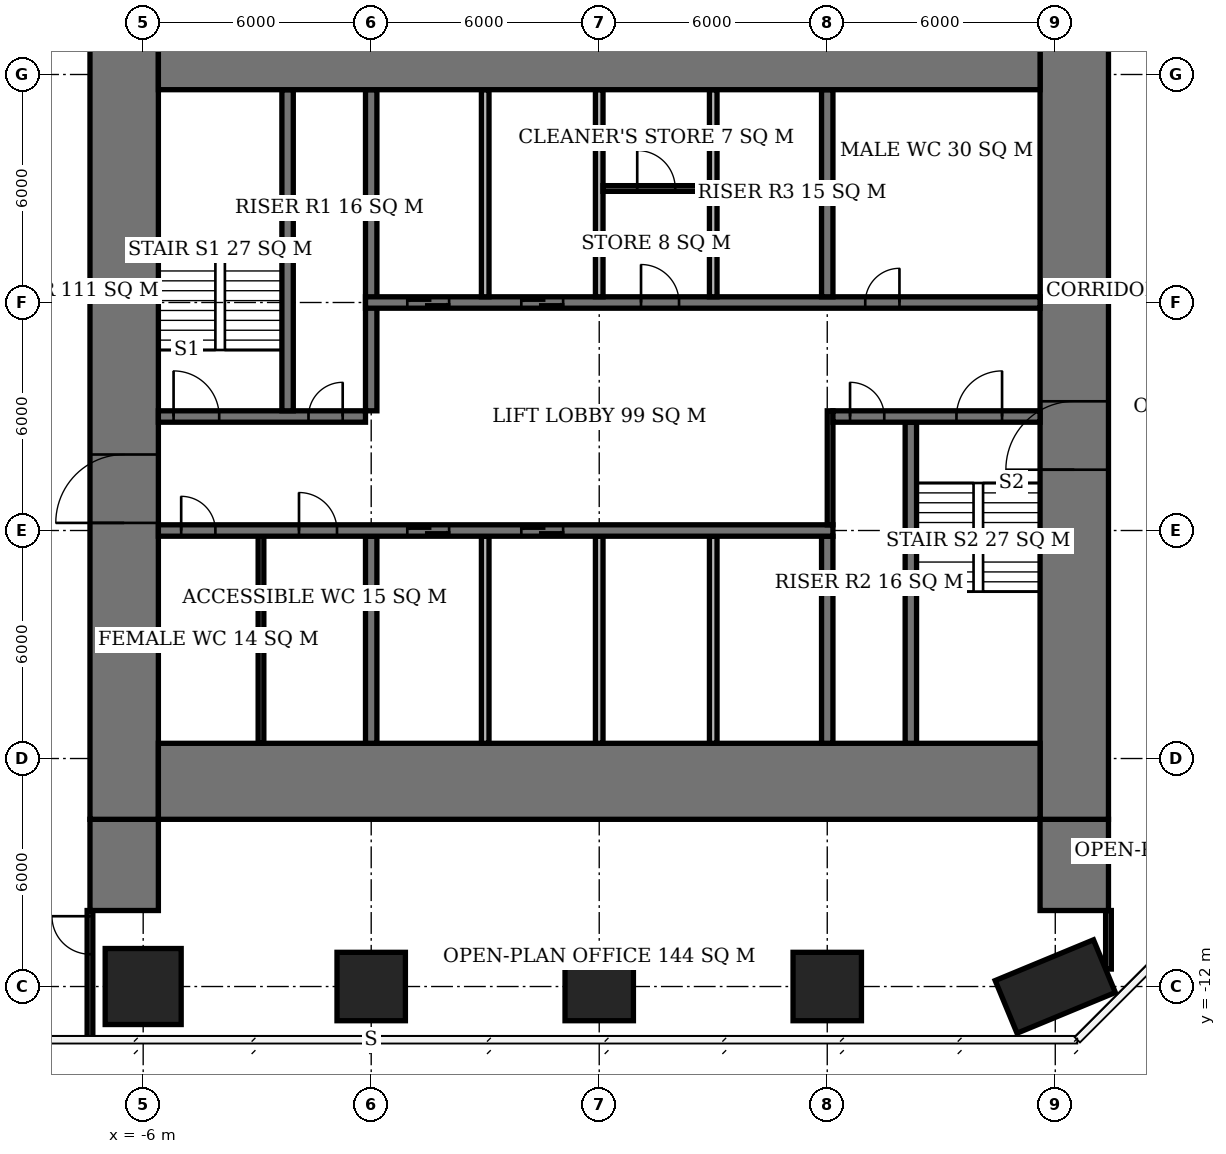
"""IFC4 building model, lengths in metres.
Left out: names, types, materials, properties, quantities, classifications, styles, units other than length and angle.
Written with IfcOpenShell. Run it as: python <this file> out.ifc"""

import sys

from ifc_helpers import new_model, si_unit, direction, frame, frame_2d, origin, origin_2d, place, context, subcontext, project, spatial, rectangle, extrude, element, fill, save


model = new_model("IFC4")
c1 = context("Model", 3, precision=1e-05, world=origin(), true_north=direction((0.0, 1.0)))
c2 = subcontext(c1, "Body", "Model", "MODEL_VIEW")
j1 = project(units=[si_unit("LENGTHUNIT", "METRE"), si_unit("PLANEANGLEUNIT", "RADIAN")], contexts=[c1])
p1 = place(None, origin())
s1 = spatial("IfcSite", under=j1, at=p1, CompositionType="ELEMENT")
p2 = place(p1, origin())
s2 = spatial("IfcBuilding", under=s1, at=p2, CompositionType="ELEMENT")
p3 = place(p2, frame((0.0, 0.0, 109.4)))
s3 = spatial("IfcBuildingStorey", under=s2, at=p3, CompositionType="ELEMENT", Elevation=109.4)
p4 = place(p3, frame((-6.0, -12.0, 0.0), z_axis=(0.0, 0.0, 1.0), x_axis=(1.0, 0.0, 0.0)))
e1 = element("IfcColumn", 1, at=p4, inside=s3, PredefinedType="COLUMN", context=c2, shape_type="SweptSolid", body=[
    extrude(rectangle(XDim=2.0, YDim=2.0, at=origin_2d()), origin(), (0.0, 0.0, 1.0), 3.9),
])
for number, where, z_axis, x_axis in (
    (2, (0.0, -12.0, 0.0), (0.0, 0.0, 1.0), (1.0, 0.0, 0.0)),
    (3, (6.0, -12.0, 0.0), (0.0, 0.0, 1.0), (1.0, 0.0, 0.0)),
    (4, (12.0, -12.0, 0.0), (0.0, 0.0, 1.0), (1.0, 0.0, 0.0)),
):
    element("IfcColumn", number, at=place(p3, frame(where, z_axis=z_axis, x_axis=x_axis)), inside=s3, PredefinedType="COLUMN", context=c2, shape_type="SweptSolid", body=[
        extrude(rectangle(XDim=1.8, YDim=1.8, at=origin_2d()), origin(), (0.0, 0.0, 1.0), 3.9),
    ])
p5 = place(p3, frame((18.0, -12.0, 0.0), z_axis=(0.0, 0.0, 1.0), x_axis=(-0.923879532511, -0.382683432365, 0.0)))
e5 = element("IfcColumn", 5, at=p5, inside=s3, PredefinedType="COLUMN", context=c2, shape_type="SweptSolid", body=[
    extrude(rectangle(XDim=2.8, YDim=1.5, at=origin_2d()), origin(), (0.0, 0.0, 1.0), 3.9),
])
for number, where, z_axis, x_axis in (
    (6, (-5.6, -6.6, 0.0), (0.0, 0.0, 1.0), (1.0, 0.0, 0.0)),
    (7, (-5.6, 12.6, 0.0), (0.0, 0.0, 1.0), (1.0, 0.0, 0.0)),
):
    element("IfcWall", number, at=place(p3, frame(where, z_axis=z_axis, x_axis=x_axis)), inside=s3, PredefinedType="SHEAR", context=c2, shape_type="SweptSolid", body=[
        extrude(rectangle(XDim=23.2, YDim=2.0, at=frame_2d((11.6, 0.0))), origin(), (0.0, 0.0, 1.0), 3.9),
    ])
p6 = place(p3, frame((-6.5, -7.6, 0.0), z_axis=(0.0, 0.0, 1.0), x_axis=(0.0, 1.0, 0.0)))
e8 = element("IfcWall", 8, at=p6, inside=s3, PredefinedType="SHEAR", context=c2, shape_type="SweptSolid", body=[
    extrude(rectangle(XDim=21.2, YDim=1.8, at=frame_2d((10.6, 0.0))), origin(), (0.0, 0.0, 1.0), 3.9),
])
p7 = place(p6, frame((7.8, 0.0, 0.0)))
e9 = element("IfcOpeningElement", 9, at=p7, cuts=e8, PredefinedType="OPENING", context=c2, shape_type="SweptSolid", body=[
    extrude(rectangle(XDim=1.8, YDim=2.4, at=frame_2d((0.9, 1.2))), frame((0.0, 0.91, 0.0), z_axis=(0.0, -1.0, 0.0), x_axis=(1.0, 0.0, 0.0)), (0.0, 0.0, 1.0), 1.82),
])
p8 = place(p3, frame((18.5, -7.6, 0.0), z_axis=(0.0, 0.0, 1.0), x_axis=(0.0, 1.0, 0.0)))
e10 = element("IfcWall", 10, at=p8, inside=s3, PredefinedType="SHEAR", context=c2, shape_type="SweptSolid", body=[
    extrude(rectangle(XDim=21.2, YDim=1.8, at=frame_2d((10.6, 0.0))), origin(), (0.0, 0.0, 1.0), 3.9),
])
p9 = place(p8, frame((9.2, 0.0, 0.0)))
e11 = element("IfcOpeningElement", 11, at=p9, cuts=e10, PredefinedType="OPENING", context=c2, shape_type="SweptSolid", body=[
    extrude(rectangle(XDim=1.8, YDim=2.4, at=frame_2d((0.9, 1.2))), frame((0.0, 0.91, 0.0), z_axis=(0.0, -1.0, 0.0), x_axis=(1.0, 0.0, 0.0)), (0.0, 0.0, 1.0), 1.82),
])
for number, where, z_axis, x_axis in (
    (12, (-6.5, -10.0, 0.0), (0.0, 0.0, 1.0), (0.0, 1.0, 0.0)),
    (13, (18.5, -10.0, 0.0), (0.0, 0.0, 1.0), (0.0, 1.0, 0.0)),
):
    element("IfcWall", number, at=place(p3, frame(where, z_axis=z_axis, x_axis=x_axis)), inside=s3, PredefinedType="SHEAR", context=c2, shape_type="SweptSolid", body=[
        extrude(rectangle(XDim=2.4, YDim=1.8, at=frame_2d((1.2, 0.0))), origin(), (0.0, 0.0, 1.0), 3.9),
    ])
p10 = place(p3, frame((-5.6, 0.0, 0.0), z_axis=(0.0, 0.0, 1.0), x_axis=(1.0, 0.0, 0.0)))
e14 = element("IfcWall", 14, at=p10, inside=s3, PredefinedType="SHEAR", context=c2, shape_type="SweptSolid", body=[
    extrude(rectangle(XDim=17.75, YDim=0.3, at=frame_2d((8.875, 0.0))), origin(), (0.0, 0.0, 1.0), 3.9),
])
p11 = place(p10, frame((0.6, 0.0, 0.0)))
e15 = element("IfcOpeningElement", 15, at=p11, cuts=e14, PredefinedType="OPENING", context=c2, shape_type="SweptSolid", body=[
    extrude(rectangle(XDim=0.9, YDim=2.1, at=frame_2d((0.45, 1.05))), frame((0.0, 0.16, 0.0), z_axis=(0.0, -1.0, 0.0), x_axis=(1.0, 0.0, 0.0)), (0.0, 0.0, 1.0), 0.32),
])
p12 = place(p10, frame((3.7, 0.0, 0.0)))
e16 = element("IfcOpeningElement", 16, at=p12, cuts=e14, PredefinedType="OPENING", context=c2, shape_type="SweptSolid", body=[
    extrude(rectangle(XDim=1.0, YDim=2.1, at=frame_2d((0.5, 1.05))), frame((0.0, 0.16, 0.0), z_axis=(0.0, -1.0, 0.0), x_axis=(1.0, 0.0, 0.0)), (0.0, 0.0, 1.0), 0.32),
])
p13 = place(p10, frame((6.55, 0.0, 0.0)))
e17 = element("IfcOpeningElement", 17, at=p13, cuts=e14, PredefinedType="OPENING", context=c2, shape_type="SweptSolid", body=[
    extrude(rectangle(XDim=1.1, YDim=2.1, at=frame_2d((0.55, 1.05))), frame((0.0, 0.16, 0.0), z_axis=(0.0, -1.0, 0.0), x_axis=(1.0, 0.0, 0.0)), (0.0, 0.0, 1.0), 0.32),
])
p14 = place(p10, frame((9.55, 0.0, 0.0)))
e18 = element("IfcOpeningElement", 18, at=p14, cuts=e14, PredefinedType="OPENING", context=c2, shape_type="SweptSolid", body=[
    extrude(rectangle(XDim=1.1, YDim=2.1, at=frame_2d((0.55, 1.05))), frame((0.0, 0.16, 0.0), z_axis=(0.0, -1.0, 0.0), x_axis=(1.0, 0.0, 0.0)), (0.0, 0.0, 1.0), 0.32),
])
p15 = place(p3, frame((-5.6, 3.0, 0.0), z_axis=(0.0, 0.0, 1.0), x_axis=(1.0, 0.0, 0.0)))
e19 = element("IfcWall", 19, at=p15, inside=s3, PredefinedType="SHEAR", context=c2, shape_type="SweptSolid", body=[
    extrude(rectangle(XDim=5.45, YDim=0.3, at=frame_2d((2.725, 0.0))), origin(), (0.0, 0.0, 1.0), 3.9),
])
p16 = place(p15, frame((0.4, 0.0, 0.0)))
e20 = element("IfcOpeningElement", 20, at=p16, cuts=e19, PredefinedType="OPENING", context=c2, shape_type="SweptSolid", body=[
    extrude(rectangle(XDim=1.2, YDim=2.1, at=frame_2d((0.6, 1.05))), frame((0.0, 0.16, 0.0), z_axis=(0.0, -1.0, 0.0), x_axis=(1.0, 0.0, 0.0)), (0.0, 0.0, 1.0), 0.32),
])
p17 = place(p15, frame((3.95, 0.0, 0.0)))
e21 = element("IfcOpeningElement", 21, at=p17, cuts=e19, PredefinedType="OPENING", context=c2, shape_type="SweptSolid", body=[
    extrude(rectangle(XDim=0.9, YDim=2.1, at=frame_2d((0.45, 1.05))), frame((0.0, 0.16, 0.0), z_axis=(0.0, -1.0, 0.0), x_axis=(1.0, 0.0, 0.0)), (0.0, 0.0, 1.0), 0.32),
])
p18 = place(p3, frame((12.15, 3.0, 0.0), z_axis=(0.0, 0.0, 1.0), x_axis=(1.0, 0.0, 0.0)))
e22 = element("IfcWall", 22, at=p18, inside=s3, PredefinedType="SHEAR", context=c2, shape_type="SweptSolid", body=[
    extrude(rectangle(XDim=5.45, YDim=0.3, at=frame_2d((2.725, 0.0))), origin(), (0.0, 0.0, 1.0), 3.9),
])
p19 = place(p18, frame((3.25, 0.0, 0.0)))
e23 = element("IfcOpeningElement", 23, at=p19, cuts=e22, PredefinedType="OPENING", context=c2, shape_type="SweptSolid", body=[
    extrude(rectangle(XDim=1.2, YDim=2.1, at=frame_2d((0.6, 1.05))), frame((0.0, 0.16, 0.0), z_axis=(0.0, -1.0, 0.0), x_axis=(1.0, 0.0, 0.0)), (0.0, 0.0, 1.0), 0.32),
])
p20 = place(p18, frame((0.45, 0.0, 0.0)))
e24 = element("IfcOpeningElement", 24, at=p20, cuts=e22, PredefinedType="OPENING", context=c2, shape_type="SweptSolid", body=[
    extrude(rectangle(XDim=0.9, YDim=2.1, at=frame_2d((0.45, 1.05))), frame((0.0, 0.16, 0.0), z_axis=(0.0, -1.0, 0.0), x_axis=(1.0, 0.0, 0.0)), (0.0, 0.0, 1.0), 0.32),
])
p21 = place(p3, frame((-0.15, 6.0, 0.0), z_axis=(0.0, 0.0, 1.0), x_axis=(1.0, 0.0, 0.0)))
e25 = element("IfcWall", 25, at=p21, inside=s3, PredefinedType="SHEAR", context=c2, shape_type="SweptSolid", body=[
    extrude(rectangle(XDim=17.75, YDim=0.3, at=frame_2d((8.875, 0.0))), origin(), (0.0, 0.0, 1.0), 3.9),
])
p22 = place(p21, frame((13.15, 0.0, 0.0)))
e26 = element("IfcOpeningElement", 26, at=p22, cuts=e25, PredefinedType="OPENING", context=c2, shape_type="SweptSolid", body=[
    extrude(rectangle(XDim=0.9, YDim=2.1, at=frame_2d((0.45, 1.05))), frame((0.0, 0.16, 0.0), z_axis=(0.0, -1.0, 0.0), x_axis=(1.0, 0.0, 0.0)), (0.0, 0.0, 1.0), 0.32),
])
p23 = place(p21, frame((7.25, 0.0, 0.0)))
e27 = element("IfcOpeningElement", 27, at=p23, cuts=e25, PredefinedType="OPENING", context=c2, shape_type="SweptSolid", body=[
    extrude(rectangle(XDim=1.0, YDim=2.1, at=frame_2d((0.5, 1.05))), frame((0.0, 0.16, 0.0), z_axis=(0.0, -1.0, 0.0), x_axis=(1.0, 0.0, 0.0)), (0.0, 0.0, 1.0), 0.32),
])
p24 = place(p21, frame((1.1, 0.0, 0.0)))
e28 = element("IfcOpeningElement", 28, at=p24, cuts=e25, PredefinedType="OPENING", context=c2, shape_type="SweptSolid", body=[
    extrude(rectangle(XDim=1.1, YDim=2.1, at=frame_2d((0.55, 1.05))), frame((0.0, 0.16, 0.0), z_axis=(0.0, -1.0, 0.0), x_axis=(1.0, 0.0, 0.0)), (0.0, 0.0, 1.0), 0.32),
])
p25 = place(p21, frame((4.1, 0.0, 0.0)))
e29 = element("IfcOpeningElement", 29, at=p25, cuts=e25, PredefinedType="OPENING", context=c2, shape_type="SweptSolid", body=[
    extrude(rectangle(XDim=1.1, YDim=2.1, at=frame_2d((0.55, 1.05))), frame((0.0, 0.16, 0.0), z_axis=(0.0, -1.0, 0.0), x_axis=(1.0, 0.0, 0.0)), (0.0, 0.0, 1.0), 0.32),
])
p26 = place(p3, frame((0.0, -5.6, 0.0), z_axis=(0.0, 0.0, 1.0), x_axis=(0.0, 1.0, 0.0)))
e30 = element("IfcWall", 30, at=p26, inside=s3, PredefinedType="SHEAR", context=c2, shape_type="SweptSolid", body=[
    extrude(rectangle(XDim=5.45, YDim=0.3, at=frame_2d((2.725, 0.0))), origin(), (0.0, 0.0, 1.0), 3.9),
])
p27 = place(p3, frame((0.0, 3.15, 0.0), z_axis=(0.0, 0.0, 1.0), x_axis=(0.0, 1.0, 0.0)))
e31 = element("IfcWall", 31, at=p27, inside=s3, PredefinedType="SHEAR", context=c2, shape_type="SweptSolid", body=[
    extrude(rectangle(XDim=8.45, YDim=0.3, at=frame_2d((4.225, 0.0))), origin(), (0.0, 0.0, 1.0), 3.9),
])
for number, where, z_axis, x_axis in (
    (32, (12.0, -5.6, 0.0), (0.0, 0.0, 1.0), (0.0, 1.0, 0.0)),
    (33, (12.0, 6.15, 0.0), (0.0, 0.0, 1.0), (0.0, 1.0, 0.0)),
):
    element("IfcWall", number, at=place(p3, frame(where, z_axis=z_axis, x_axis=x_axis)), inside=s3, PredefinedType="SHEAR", context=c2, shape_type="SweptSolid", body=[
        extrude(rectangle(XDim=5.45, YDim=0.3, at=frame_2d((2.725, 0.0))), origin(), (0.0, 0.0, 1.0), 3.9),
    ])
for number, where, z_axis, x_axis in (
    (34, (-2.2, 3.15, 0.0), (0.0, 0.0, 1.0), (0.0, 1.0, 0.0)),
    (35, (14.2, -5.6, 0.0), (0.0, 0.0, 1.0), (0.0, 1.0, 0.0)),
):
    element("IfcWall", number, at=place(p3, frame(where, z_axis=z_axis, x_axis=x_axis)), inside=s3, PredefinedType="SHEAR", context=c2, shape_type="SweptSolid", body=[
        extrude(rectangle(XDim=8.45, YDim=0.3, at=frame_2d((4.225, 0.0))), origin(), (0.0, 0.0, 1.0), 3.9),
    ])
for number, where, z_axis, x_axis in (
    (36, (3.0, 6.15, 0.0), (0.0, 0.0, 1.0), (0.0, 1.0, 0.0)),
    (37, (6.0, 6.15, 0.0), (0.0, 0.0, 1.0), (0.0, 1.0, 0.0)),
    (38, (9.0, 6.15, 0.0), (0.0, 0.0, 1.0), (0.0, 1.0, 0.0)),
    (39, (3.0, -5.6, 0.0), (0.0, 0.0, 1.0), (0.0, 1.0, 0.0)),
    (40, (6.0, -5.6, 0.0), (0.0, 0.0, 1.0), (0.0, 1.0, 0.0)),
    (41, (9.0, -5.6, 0.0), (0.0, 0.0, 1.0), (0.0, 1.0, 0.0)),
):
    element("IfcWall", number, at=place(p3, frame(where, z_axis=z_axis, x_axis=x_axis)), inside=s3, PredefinedType="SOLIDWALL", context=c2, shape_type="SweptSolid", body=[
        extrude(rectangle(XDim=5.45, YDim=0.2, at=frame_2d((2.725, 0.0))), origin(), (0.0, 0.0, 1.0), 3.9),
    ])
p28 = place(p3, frame((-2.9, -5.6, 0.0), z_axis=(0.0, 0.0, 1.0), x_axis=(0.0, 1.0, 0.0)))
e42 = element("IfcWall", 42, at=p28, inside=s3, PredefinedType="PLUMBINGWALL", context=c2, shape_type="SweptSolid", body=[
    extrude(rectangle(XDim=5.45, YDim=0.15, at=frame_2d((2.725, 0.0))), origin(), (0.0, 0.0, 1.0), 3.65),
])
p29 = place(p3, frame((6.1, 9.0, 0.0), z_axis=(0.0, 0.0, 1.0), x_axis=(1.0, 0.0, 0.0)))
e43 = element("IfcWall", 43, at=p29, inside=s3, PredefinedType="PARTITIONING", context=c2, shape_type="SweptSolid", body=[
    extrude(rectangle(XDim=2.8, YDim=0.15, at=frame_2d((1.4, 0.0))), origin(), (0.0, 0.0, 1.0), 3.65),
])
p30 = place(p29, frame((0.9, 0.0, 0.0)))
e44 = element("IfcOpeningElement", 44, at=p30, cuts=e43, PredefinedType="OPENING", context=c2, shape_type="SweptSolid", body=[
    extrude(rectangle(XDim=1.0, YDim=2.1, at=frame_2d((0.5, 1.05))), frame((0.0, 0.085, 0.0), z_axis=(0.0, -1.0, 0.0), x_axis=(1.0, 0.0, 0.0)), (0.0, 0.0, 1.0), 0.17),
])
p31 = place(p3, frame((-7.4, -13.4, 0.0), z_axis=(0.0, 0.0, 1.0), x_axis=(0.0, 1.0, 0.0)))
e45 = element("IfcWall", 45, at=p31, inside=s3, PredefinedType="PARTITIONING", context=c2, shape_type="SweptSolid", body=[
    extrude(rectangle(XDim=3.4, YDim=0.15, at=frame_2d((1.7, 0.0))), origin(), (0.0, 0.0, 1.0), 3.65),
])
p32 = place(p31, frame((2.25, 0.0, 0.0)))
e46 = element("IfcOpeningElement", 46, at=p32, cuts=e45, PredefinedType="OPENING", context=c2, shape_type="SweptSolid", body=[
    extrude(rectangle(XDim=1.0, YDim=2.1, at=frame_2d((0.5, 1.05))), frame((0.0, 0.085, 0.0), z_axis=(0.0, -1.0, 0.0), x_axis=(1.0, 0.0, 0.0)), (0.0, 0.0, 1.0), 0.17),
])
p33 = place(p3, frame((19.4, -11.541, 0.0), z_axis=(0.0, 0.0, 1.0), x_axis=(0.0, 1.0, 0.0)))
e47 = element("IfcWall", 47, at=p33, inside=s3, PredefinedType="PARTITIONING", context=c2, shape_type="SweptSolid", body=[
    extrude(rectangle(XDim=1.541, YDim=0.15, at=frame_2d((0.77, 0.0))), origin(), (0.0, 0.0, 1.0), 3.65),
])
p34 = place(p3, frame((12.075, 0.15, 0.0), z_axis=(0.0, 0.0, 1.0), x_axis=(0.0, 1.0, 0.0)))
e48 = element("IfcWall", 48, at=p34, inside=s3, PredefinedType="PARTITIONING", context=c2, shape_type="SweptSolid", body=[
    extrude(rectangle(XDim=3.0, YDim=0.15, at=frame_2d((1.5, 0.0))), origin(), (0.0, 0.0, 1.0), 3.65),
])
p35 = place(p7, origin())
e49 = element("IfcDoor", 49, at=p35, inside=s3, OperationType="DOUBLE_DOOR_SINGLE_SWING", PredefinedType="DOOR", context=c2, shape_type="SweptSolid", body=[
    extrude(rectangle(XDim=1.8, YDim=2.4, at=frame_2d((0.9, 1.2))), frame((0.0, 0.025, 0.0), z_axis=(0.0, -1.0, 0.0), x_axis=(1.0, 0.0, 0.0)), (0.0, 0.0, 1.0), 0.05),
])
fill(e9, e49)
p36 = place(p9, origin())
e50 = element("IfcDoor", 50, at=p36, inside=s3, OperationType="DOUBLE_DOOR_SINGLE_SWING", PredefinedType="DOOR", context=c2, shape_type="SweptSolid", body=[
    extrude(rectangle(XDim=1.8, YDim=2.4, at=frame_2d((0.9, 1.2))), frame((0.0, 0.025, 0.0), z_axis=(0.0, -1.0, 0.0), x_axis=(1.0, 0.0, 0.0)), (0.0, 0.0, 1.0), 0.05),
])
fill(e11, e50)
p37 = place(p16, origin())
e51 = element("IfcDoor", 51, at=p37, inside=s3, OperationType="SINGLE_SWING_LEFT", PredefinedType="DOOR", context=c2, shape_type="SweptSolid", body=[
    extrude(rectangle(XDim=1.2, YDim=2.1, at=frame_2d((0.6, 1.05))), frame((0.0, 0.025, 0.0), z_axis=(0.0, -1.0, 0.0), x_axis=(1.0, 0.0, 0.0)), (0.0, 0.0, 1.0), 0.05),
])
fill(e20, e51)
p38 = place(p17, origin())
e52 = element("IfcDoor", 52, at=p38, inside=s3, OperationType="SINGLE_SWING_RIGHT", PredefinedType="DOOR", context=c2, shape_type="SweptSolid", body=[
    extrude(rectangle(XDim=0.9, YDim=2.1, at=frame_2d((0.45, 1.05))), frame((0.0, 0.025, 0.0), z_axis=(0.0, -1.0, 0.0), x_axis=(1.0, 0.0, 0.0)), (0.0, 0.0, 1.0), 0.05),
])
fill(e21, e52)
p39 = place(p19, origin())
e53 = element("IfcDoor", 53, at=p39, inside=s3, OperationType="SINGLE_SWING_RIGHT", PredefinedType="DOOR", context=c2, shape_type="SweptSolid", body=[
    extrude(rectangle(XDim=1.2, YDim=2.1, at=frame_2d((0.6, 1.05))), frame((0.0, 0.025, 0.0), z_axis=(0.0, -1.0, 0.0), x_axis=(1.0, 0.0, 0.0)), (0.0, 0.0, 1.0), 0.05),
])
fill(e23, e53)
p40 = place(p20, origin())
e54 = element("IfcDoor", 54, at=p40, inside=s3, OperationType="SINGLE_SWING_LEFT", PredefinedType="DOOR", context=c2, shape_type="SweptSolid", body=[
    extrude(rectangle(XDim=0.9, YDim=2.1, at=frame_2d((0.45, 1.05))), frame((0.0, 0.025, 0.0), z_axis=(0.0, -1.0, 0.0), x_axis=(1.0, 0.0, 0.0)), (0.0, 0.0, 1.0), 0.05),
])
fill(e24, e54)
p41 = place(p11, origin())
e55 = element("IfcDoor", 55, at=p41, inside=s3, OperationType="SINGLE_SWING_LEFT", PredefinedType="DOOR", context=c2, shape_type="SweptSolid", body=[
    extrude(rectangle(XDim=0.9, YDim=2.1, at=frame_2d((0.45, 1.05))), frame((0.0, 0.025, 0.0), z_axis=(0.0, -1.0, 0.0), x_axis=(1.0, 0.0, 0.0)), (0.0, 0.0, 1.0), 0.05),
])
fill(e15, e55)
p42 = place(p12, origin())
e56 = element("IfcDoor", 56, at=p42, inside=s3, OperationType="SINGLE_SWING_LEFT", PredefinedType="DOOR", context=c2, shape_type="SweptSolid", body=[
    extrude(rectangle(XDim=1.0, YDim=2.1, at=frame_2d((0.5, 1.05))), frame((0.0, 0.025, 0.0), z_axis=(0.0, -1.0, 0.0), x_axis=(1.0, 0.0, 0.0)), (0.0, 0.0, 1.0), 0.05),
])
fill(e16, e56)
p43 = place(p22, origin())
e57 = element("IfcDoor", 57, at=p43, inside=s3, OperationType="SINGLE_SWING_RIGHT", PredefinedType="DOOR", context=c2, shape_type="SweptSolid", body=[
    extrude(rectangle(XDim=0.9, YDim=2.1, at=frame_2d((0.45, 1.05))), frame((0.0, 0.025, 0.0), z_axis=(0.0, -1.0, 0.0), x_axis=(1.0, 0.0, 0.0)), (0.0, 0.0, 1.0), 0.05),
])
fill(e26, e57)
p44 = place(p30, origin())
e58 = element("IfcDoor", 58, at=p44, inside=s3, OperationType="SINGLE_SWING_LEFT", PredefinedType="DOOR", context=c2, shape_type="SweptSolid", body=[
    extrude(rectangle(XDim=1.0, YDim=2.1, at=frame_2d((0.5, 1.05))), frame((0.0, 0.025, 0.0), z_axis=(0.0, -1.0, 0.0), x_axis=(1.0, 0.0, 0.0)), (0.0, 0.0, 1.0), 0.05),
])
fill(e44, e58)
p45 = place(p23, origin())
e59 = element("IfcDoor", 59, at=p45, inside=s3, OperationType="SINGLE_SWING_LEFT", PredefinedType="DOOR", context=c2, shape_type="SweptSolid", body=[
    extrude(rectangle(XDim=1.0, YDim=2.1, at=frame_2d((0.5, 1.05))), frame((0.0, 0.025, 0.0), z_axis=(0.0, -1.0, 0.0), x_axis=(1.0, 0.0, 0.0)), (0.0, 0.0, 1.0), 0.05),
])
fill(e27, e59)
p46 = place(p24, origin())
e60 = element("IfcDoor", 60, at=p46, inside=s3, OperationType="DOUBLE_DOOR_SLIDING", PredefinedType="USERDEFINED", context=c2, shape_type="SweptSolid", body=[
    extrude(rectangle(XDim=1.1, YDim=2.1, at=frame_2d((0.55, 1.05))), frame((0.0, 0.025, 0.0), z_axis=(0.0, -1.0, 0.0), x_axis=(1.0, 0.0, 0.0)), (0.0, 0.0, 1.0), 0.05),
])
fill(e28, e60)
p47 = place(p25, origin())
e61 = element("IfcDoor", 61, at=p47, inside=s3, OperationType="DOUBLE_DOOR_SLIDING", PredefinedType="USERDEFINED", context=c2, shape_type="SweptSolid", body=[
    extrude(rectangle(XDim=1.1, YDim=2.1, at=frame_2d((0.55, 1.05))), frame((0.0, 0.025, 0.0), z_axis=(0.0, -1.0, 0.0), x_axis=(1.0, 0.0, 0.0)), (0.0, 0.0, 1.0), 0.05),
])
fill(e29, e61)
p48 = place(p13, origin())
e62 = element("IfcDoor", 62, at=p48, inside=s3, OperationType="DOUBLE_DOOR_SLIDING", PredefinedType="USERDEFINED", context=c2, shape_type="SweptSolid", body=[
    extrude(rectangle(XDim=1.1, YDim=2.1, at=frame_2d((0.55, 1.05))), frame((0.0, 0.025, 0.0), z_axis=(0.0, -1.0, 0.0), x_axis=(1.0, 0.0, 0.0)), (0.0, 0.0, 1.0), 0.05),
])
fill(e17, e62)
p49 = place(p14, origin())
e63 = element("IfcDoor", 63, at=p49, inside=s3, OperationType="DOUBLE_DOOR_SLIDING", PredefinedType="USERDEFINED", context=c2, shape_type="SweptSolid", body=[
    extrude(rectangle(XDim=1.1, YDim=2.1, at=frame_2d((0.55, 1.05))), frame((0.0, 0.025, 0.0), z_axis=(0.0, -1.0, 0.0), x_axis=(1.0, 0.0, 0.0)), (0.0, 0.0, 1.0), 0.05),
])
fill(e18, e63)
p50 = place(p32, origin())
e64 = element("IfcDoor", 64, at=p50, inside=s3, OperationType="SINGLE_SWING_RIGHT", PredefinedType="DOOR", context=c2, shape_type="SweptSolid", body=[
    extrude(rectangle(XDim=1.0, YDim=2.1, at=frame_2d((0.5, 1.05))), frame((0.0, 0.025, 0.0), z_axis=(0.0, -1.0, 0.0), x_axis=(1.0, 0.0, 0.0)), (0.0, 0.0, 1.0), 0.05),
])
fill(e46, e64)
save(model, sys.argv[1])
